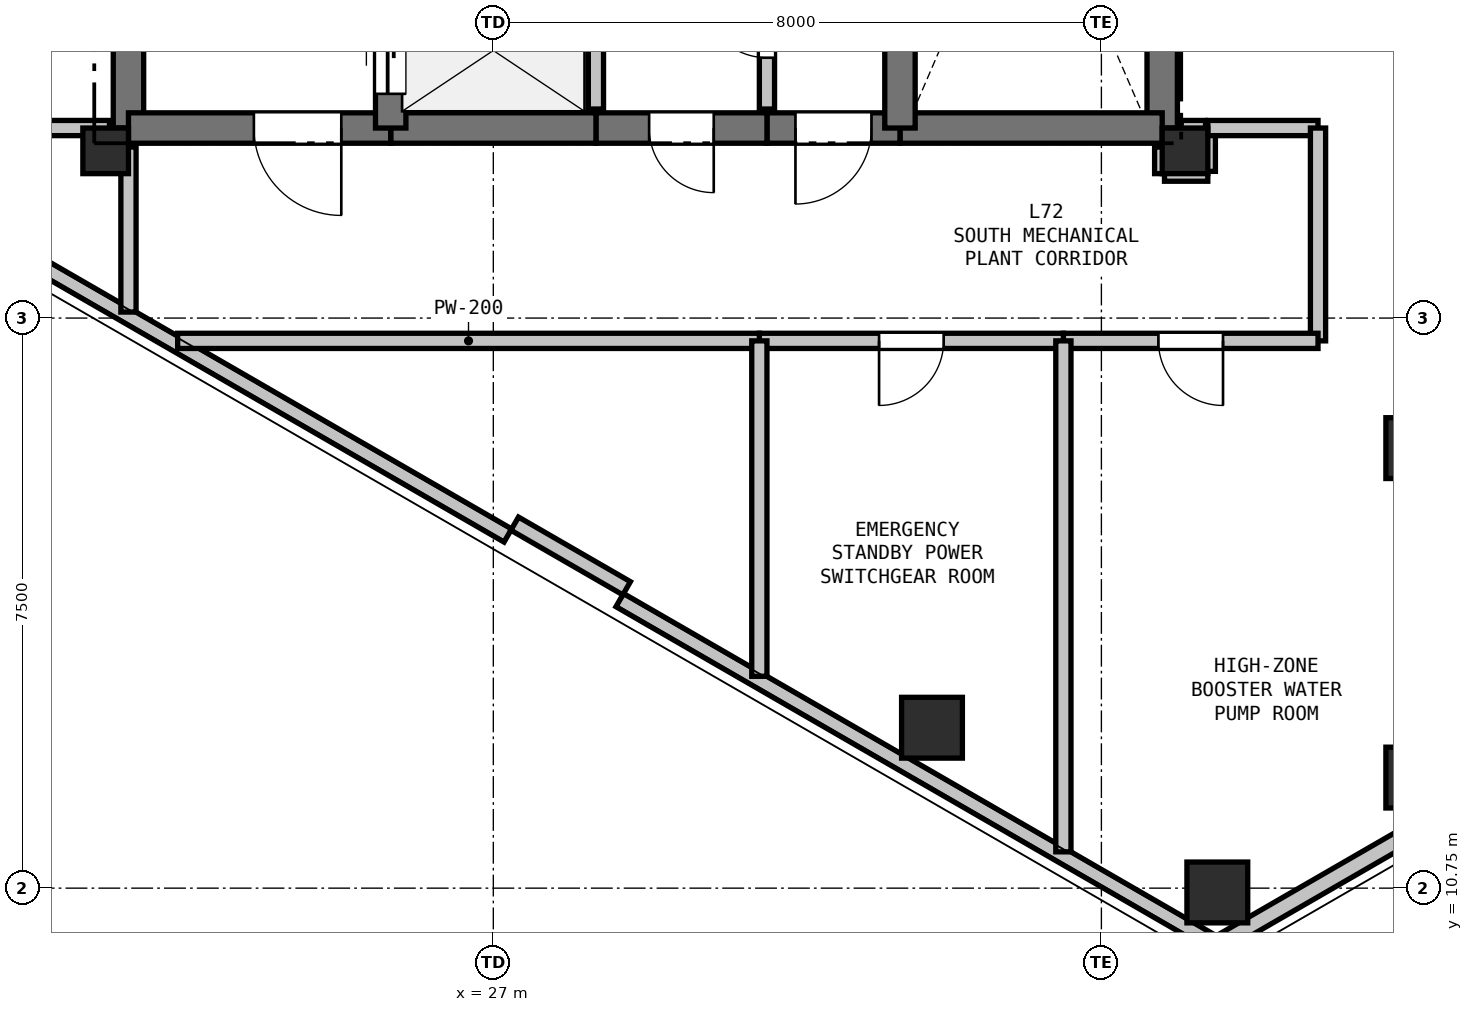
"""IFC4 building model, lengths in metres.
Left out: names, types, materials, properties, quantities, classifications, styles, units other than length and angle.
Written with IfcOpenShell. Run it as: python <this file> out.ifc"""

import sys

from ifc_helpers import new_model, si_unit, direction, frame, frame_2d, origin, origin_2d, place, context, subcontext, project, spatial, rectangle, hollow_rectangle, extrude, element, fill, save


model = new_model("IFC4")
c1 = context("Model", 3, precision=1e-05, world=origin(), true_north=direction((0.0, 1.0)))
c2 = subcontext(c1, "Body", "Model", "MODEL_VIEW")
j1 = project(units=[si_unit("LENGTHUNIT", "METRE"), si_unit("PLANEANGLEUNIT", "RADIAN")], contexts=[c1])
p1 = place(None, origin())
s1 = spatial("IfcSite", under=j1, at=p1, CompositionType="ELEMENT")
p2 = place(p1, origin())
s2 = spatial("IfcBuilding", under=s1, at=p2, CompositionType="ELEMENT")
p3 = place(p2, frame((0.0, 0.0, 258.6)))
s3 = spatial("IfcBuildingStorey", under=s2, at=p3, CompositionType="ELEMENT", Elevation=258.6)
for number, where, z_axis, x_axis in (
    (1, (21.9, 20.45, 0.0), (0.0, 0.0, 1.0), (1.0, 0.0, 0.0)),
    (2, (36.1, 20.45, 0.0), (0.0, 0.0, 1.0), (1.0, 0.0, 0.0)),
):
    element("IfcColumn", number, at=place(p3, frame(where, z_axis=z_axis, x_axis=x_axis)), inside=s3, PredefinedType="COLUMN", context=c2, shape_type="SweptSolid", body=[
        extrude(rectangle(XDim=0.6, YDim=0.6, at=origin_2d()), origin(), (0.0, 0.0, 1.0), 5.4),
    ])
for number, where, z_axis, x_axis in (
    (3, (39.143, 16.539, 0.0), (0.0, 0.0, 1.0), (1.0, 0.0, 0.0)),
    (4, (39.143, 12.205, 0.0), (0.0, 0.0, 1.0), (1.0, 0.0, 0.0)),
    (5, (36.525, 10.693, 0.0), (0.0, 0.0, 1.0), (1.0, 0.0, 0.0)),
    (6, (32.771, 12.861, 0.0), (0.0, 0.0, 1.0), (1.0, 0.0, 0.0)),
):
    element("IfcColumn", number, at=place(p3, frame(where, z_axis=z_axis, x_axis=x_axis)), inside=s3, PredefinedType="COLUMN", context=c2, shape_type="SweptSolid", body=[
        extrude(hollow_rectangle(XDim=0.8, YDim=0.8, WallThickness=0.025, at=origin_2d()), origin(), (0.0, 0.0, 1.0), 5.4),
    ])
p4 = place(p3, frame((39.743, 11.858, 0.0), z_axis=(0.0, 0.0, 1.0), x_axis=(-0.866038962515, -0.499976514854, 0.0)))
e7 = element("IfcWall", 7, at=p4, inside=s3, PredefinedType="SOLIDWALL", context=c2, shape_type="SweptSolid", body=[
    extrude(rectangle(XDim=3.716, YDim=0.225, at=frame_2d((1.858, 0.0))), origin(), (0.0, 0.0, 1.0), 4.7),
])
p5 = place(p3, frame((36.395, 10.076, 0.0), z_axis=(0.0, 0.0, 1.0), x_axis=(-0.866026655105, 0.499997832642, 0.0)))
e8 = element("IfcWall", 8, at=p5, inside=s3, PredefinedType="PARAPET", context=c2, shape_type="SweptSolid", body=[
    extrude(rectangle(XDim=8.928, YDim=0.2, at=frame_2d((4.464, 0.0))), origin(), (0.0, 0.0, 1.0), 0.2),
])
p6 = place(p3, frame((27.191, 15.389, 0.0), z_axis=(0.0, 0.0, 1.0), x_axis=(-0.866019557082, 0.500010126649, 0.0)))
e9 = element("IfcWall", 9, at=p6, inside=s3, PredefinedType="PARAPET", context=c2, shape_type="SweptSolid", body=[
    extrude(rectangle(XDim=8.228, YDim=0.2, at=frame_2d((4.114, 0.0))), origin(), (0.0, 0.0, 1.0), 0.2),
])
p7 = place(p3, frame((28.754, 14.695, 0.0), z_axis=(0.0, 0.0, 1.0), x_axis=(-0.866025371046, 0.500000056704, 0.0)))
e10 = element("IfcWall", 10, at=p7, inside=s3, PredefinedType="PARAPET", context=c2, shape_type="SweptSolid", body=[
    extrude(rectangle(XDim=1.7, YDim=0.2, at=frame_2d((0.85, 0.0))), origin(), (0.0, 0.0, 1.0), 4.7),
])
p8 = place(p3, frame((22.2, 20.75, 0.0), z_axis=(0.0, 0.0, 1.0), x_axis=(0.0, 1.0, 0.0)))
e11 = element("IfcWall", 11, at=p8, inside=s3, PredefinedType="SHEAR", context=c2, shape_type="SweptSolid", body=[
    extrude(rectangle(XDim=4.65, YDim=0.4, at=frame_2d((2.325, 0.0))), origin(), (0.0, 0.0, 1.0), 5.08),
])
p9 = place(p3, frame((35.8, 28.1, 0.0), z_axis=(0.0, 0.0, 1.0), x_axis=(0.0, -1.0, 0.0)))
e12 = element("IfcWall", 12, at=p9, inside=s3, PredefinedType="SHEAR", context=c2, shape_type="SweptSolid", body=[
    extrude(rectangle(XDim=7.35, YDim=0.4, at=frame_2d((3.675, 0.0))), origin(), (0.0, 0.0, 1.0), 5.08),
])
p10 = place(p3, frame((35.8, 20.75, 0.0), z_axis=(0.0, 0.0, 1.0), x_axis=(-1.0, 0.0, 0.0)))
e13 = element("IfcWall", 13, at=p10, inside=s3, PredefinedType="SHEAR", context=c2, shape_type="SweptSolid", body=[
    extrude(rectangle(XDim=3.45, YDim=0.4, at=frame_2d((1.725, 0.0))), origin(), (0.0, 0.0, 1.0), 5.08),
])
p11 = place(p3, frame((32.35, 20.75, 0.0), z_axis=(0.0, 0.0, 1.0), x_axis=(-1.0, 0.0, 0.0)))
e14 = element("IfcWall", 14, at=p11, inside=s3, PredefinedType="SHEAR", context=c2, shape_type="SweptSolid", body=[
    extrude(rectangle(XDim=1.75, YDim=0.4, at=frame_2d((0.875, 0.0))), origin(), (0.0, 0.0, 1.0), 5.08),
])
p12 = place(p11, frame((0.375, 0.0, 0.0)))
e15 = element("IfcOpeningElement", 15, at=p12, cuts=e14, PredefinedType="OPENING", context=c2, shape_type="SweptSolid", body=[
    extrude(rectangle(XDim=1.0, YDim=2.15, at=frame_2d((0.5, 1.075))), frame((0.0, 0.21, 0.0), z_axis=(0.0, -1.0, 0.0), x_axis=(1.0, 0.0, 0.0)), (0.0, 0.0, 1.0), 0.42),
])
p13 = place(p3, frame((30.6, 20.75, 0.0), z_axis=(0.0, 0.0, 1.0), x_axis=(-1.0, 0.0, 0.0)))
e16 = element("IfcWall", 16, at=p13, inside=s3, PredefinedType="SHEAR", context=c2, shape_type="SweptSolid", body=[
    extrude(rectangle(XDim=2.25, YDim=0.4, at=frame_2d((1.125, 0.0))), origin(), (0.0, 0.0, 1.0), 5.08),
])
p14 = place(p13, frame((0.7, 0.0, 0.0)))
e17 = element("IfcOpeningElement", 17, at=p14, cuts=e16, PredefinedType="OPENING", context=c2, shape_type="SweptSolid", body=[
    extrude(rectangle(XDim=0.85, YDim=2.1, at=frame_2d((0.425, 1.05))), frame((0.0, 0.21, 0.0), z_axis=(0.0, -1.0, 0.0), x_axis=(1.0, 0.0, 0.0)), (0.0, 0.0, 1.0), 0.42),
])
p15 = place(p3, frame((28.35, 20.75, 0.0), z_axis=(0.0, 0.0, 1.0), x_axis=(-1.0, 0.0, 0.0)))
e18 = element("IfcWall", 18, at=p15, inside=s3, PredefinedType="SHEAR", context=c2, shape_type="SweptSolid", body=[
    extrude(rectangle(XDim=2.7, YDim=0.4, at=frame_2d((1.35, 0.0))), origin(), (0.0, 0.0, 1.0), 5.08),
])
p16 = place(p3, frame((25.65, 20.75, 0.0), z_axis=(0.0, 0.0, 1.0), x_axis=(-1.0, 0.0, 0.0)))
e19 = element("IfcWall", 19, at=p16, inside=s3, PredefinedType="SHEAR", context=c2, shape_type="SweptSolid", body=[
    extrude(rectangle(XDim=3.45, YDim=0.4, at=frame_2d((1.725, 0.0))), origin(), (0.0, 0.0, 1.0), 5.08),
])
p17 = place(p16, frame((0.65, 0.0, 0.0)))
e20 = element("IfcOpeningElement", 20, at=p17, cuts=e19, PredefinedType="OPENING", context=c2, shape_type="SweptSolid", body=[
    extrude(rectangle(XDim=1.15, YDim=2.15, at=frame_2d((0.575, 1.075))), frame((0.0, 0.21, 0.0), z_axis=(0.0, -1.0, 0.0), x_axis=(1.0, 0.0, 0.0)), (0.0, 0.0, 1.0), 0.42),
])
p18 = place(p3, frame((25.65, 20.75, 0.0), z_axis=(0.0, 0.0, 1.0), x_axis=(0.0, 1.0, 0.0)))
e21 = element("IfcWall", 21, at=p18, inside=s3, PredefinedType="SHEAR", context=c2, shape_type="SweptSolid", body=[
    extrude(rectangle(XDim=2.0, YDim=0.4, at=frame_2d((1.0, 0.0))), origin(), (0.0, 0.0, 1.0), 5.08),
])
p19 = place(p18, frame((0.45, 0.0, 0.0)))
e22 = element("IfcOpeningElement", 22, at=p19, cuts=e21, PredefinedType="OPENING", context=c2, shape_type="SweptSolid", body=[
    extrude(rectangle(XDim=1.1, YDim=2.15, at=frame_2d((0.55, 1.075))), frame((0.0, 0.21, 0.0), z_axis=(0.0, -1.0, 0.0), x_axis=(1.0, 0.0, 0.0)), (0.0, 0.0, 1.0), 0.42),
])
p20 = place(p3, frame((32.35, 20.75, 0.0), z_axis=(0.0, 0.0, 1.0), x_axis=(0.0, 1.0, 0.0)))
e23 = element("IfcWall", 23, at=p20, inside=s3, PredefinedType="SHEAR", context=c2, shape_type="SweptSolid", body=[
    extrude(rectangle(XDim=4.8, YDim=0.4, at=frame_2d((2.4, 0.0))), origin(), (0.0, 0.0, 1.0), 5.08),
])
p21 = place(p3, frame((28.35, 23.2, 0.0), z_axis=(0.0, 0.0, 1.0), x_axis=(0.0, -1.0, 0.0)))
e24 = element("IfcWall", 24, at=p21, inside=s3, PredefinedType="PARTITIONING", context=c2, shape_type="SweptSolid", body=[
    extrude(rectangle(XDim=2.2, YDim=0.2, at=frame_2d((1.1, 0.0))), origin(), (0.0, 0.0, 1.0), 5.08),
])
p22 = place(p3, frame((30.6, 21.0, 0.0), z_axis=(0.0, 0.0, 1.0), x_axis=(0.0, 1.0, 0.0)))
e25 = element("IfcWall", 25, at=p22, inside=s3, PredefinedType="PARTITIONING", context=c2, shape_type="SweptSolid", body=[
    extrude(rectangle(XDim=2.2, YDim=0.2, at=frame_2d((1.1, 0.0))), origin(), (0.0, 0.0, 1.0), 5.08),
])
p23 = place(p22, frame((0.675, 0.0, 0.0)))
e26 = element("IfcOpeningElement", 26, at=p23, cuts=e25, PredefinedType="OPENING", context=c2, shape_type="SweptSolid", body=[
    extrude(rectangle(XDim=0.85, YDim=2.1, at=frame_2d((0.425, 1.05))), frame((0.0, 0.11, 0.0), z_axis=(0.0, -1.0, 0.0), x_axis=(1.0, 0.0, 0.0)), (0.0, 0.0, 1.0), 0.22),
])
p24 = place(p3, frame((35.8, 20.5, 0.0), z_axis=(0.0, 0.0, 1.0), x_axis=(0.0, -1.0, 0.0)))
e27 = element("IfcWall", 27, at=p24, inside=s3, PredefinedType="PARTITIONING", context=c2, shape_type="SweptSolid", body=[
    extrude(rectangle(XDim=0.35, YDim=0.2, at=frame_2d((0.175, 0.0))), origin(), (0.0, 0.0, 1.0), 4.605),
])
p25 = place(p3, frame((35.83, 20.15, 0.0), z_axis=(0.0, 0.0, 1.0), x_axis=(1.0, 0.0, 0.0)))
e28 = element("IfcWall", 28, at=p25, inside=s3, PredefinedType="PARTITIONING", context=c2, shape_type="SweptSolid", body=[
    extrude(rectangle(XDim=0.57, YDim=0.2, at=frame_2d((0.285, 0.0))), origin(), (0.0, 0.0, 1.0), 4.528),
])
p26 = place(p3, frame((36.4, 20.18, 0.0), z_axis=(0.0, 0.0, 1.0), x_axis=(0.0, 1.0, 0.0)))
e29 = element("IfcWall", 29, at=p26, inside=s3, PredefinedType="PARTITIONING", context=c2, shape_type="SweptSolid", body=[
    extrude(rectangle(XDim=0.57, YDim=0.2, at=frame_2d((0.285, 0.0))), origin(), (0.0, 0.0, 1.0), 5.08),
])
p27 = place(p3, frame((36.4, 20.75, 0.0), z_axis=(0.0, 0.0, 1.0), x_axis=(1.0, 0.0, 0.0)))
e30 = element("IfcWall", 30, at=p27, inside=s3, PredefinedType="PARTITIONING", context=c2, shape_type="SweptSolid", body=[
    extrude(rectangle(XDim=1.45, YDim=0.2, at=frame_2d((0.725, 0.0))), origin(), (0.0, 0.0, 1.0), 5.08),
])
p28 = place(p3, frame((37.85, 20.75, 0.0), z_axis=(0.0, 0.0, 1.0), x_axis=(0.0, -1.0, 0.0)))
e31 = element("IfcWall", 31, at=p28, inside=s3, PredefinedType="PARTITIONING", context=c2, shape_type="SweptSolid", body=[
    extrude(rectangle(XDim=2.8, YDim=0.2, at=frame_2d((1.4, 0.0))), origin(), (0.0, 0.0, 1.0), 5.08),
])
p29 = place(p3, frame((37.85, 17.95, 0.0), z_axis=(0.0, 0.0, 1.0), x_axis=(-1.0, 0.0, 0.0)))
e32 = element("IfcWall", 32, at=p29, inside=s3, PredefinedType="PARTITIONING", context=c2, shape_type="SweptSolid", body=[
    extrude(rectangle(XDim=3.35, YDim=0.2, at=frame_2d((1.675, 0.0))), origin(), (0.0, 0.0, 1.0), 4.528),
])
p30 = place(p29, frame((1.25, 0.0, 0.0)))
e33 = element("IfcOpeningElement", 33, at=p30, cuts=e32, PredefinedType="OPENING", context=c2, shape_type="SweptSolid", body=[
    extrude(rectangle(XDim=0.85, YDim=2.1, at=frame_2d((0.425, 1.05))), frame((0.0, 0.11, 0.0), z_axis=(0.0, -1.0, 0.0), x_axis=(1.0, 0.0, 0.0)), (0.0, 0.0, 1.0), 0.22),
])
p31 = place(p3, frame((34.5, 17.95, 0.0), z_axis=(0.0, 0.0, 1.0), x_axis=(-1.0, 0.0, 0.0)))
e34 = element("IfcWall", 34, at=p31, inside=s3, PredefinedType="PARTITIONING", context=c2, shape_type="SweptSolid", body=[
    extrude(rectangle(XDim=4.0, YDim=0.2, at=frame_2d((2.0, 0.0))), origin(), (0.0, 0.0, 1.0), 5.08),
])
p32 = place(p31, frame((1.575, 0.0, 0.0)))
e35 = element("IfcOpeningElement", 35, at=p32, cuts=e34, PredefinedType="OPENING", context=c2, shape_type="SweptSolid", body=[
    extrude(rectangle(XDim=0.85, YDim=2.1, at=frame_2d((0.425, 1.05))), frame((0.0, 0.11, 0.0), z_axis=(0.0, -1.0, 0.0), x_axis=(1.0, 0.0, 0.0)), (0.0, 0.0, 1.0), 0.22),
])
p33 = place(p3, frame((30.5, 17.95, 0.0), z_axis=(0.0, 0.0, 1.0), x_axis=(-1.0, 0.0, 0.0)))
e36 = element("IfcWall", 36, at=p33, inside=s3, PredefinedType="PARTITIONING", context=c2, shape_type="SweptSolid", body=[
    extrude(rectangle(XDim=7.653, YDim=0.2, at=frame_2d((3.826, 0.0))), origin(), (0.0, 0.0, 1.0), 4.528),
])
p34 = place(p3, frame((22.2, 18.329, 0.0), z_axis=(0.0, 0.0, 1.0), x_axis=(0.0, 1.0, 0.0)))
e37 = element("IfcWall", 37, at=p34, inside=s3, PredefinedType="PARTITIONING", context=c2, shape_type="SweptSolid", body=[
    extrude(rectangle(XDim=2.171, YDim=0.2, at=frame_2d((1.085, 0.0))), origin(), (0.0, 0.0, 1.0), 4.528),
])
p35 = place(p3, frame((21.95, 20.75, 0.0), z_axis=(0.0, 0.0, 1.0), x_axis=(-1.0, 0.0, 0.0)))
e38 = element("IfcWall", 38, at=p35, inside=s3, PredefinedType="PARTITIONING", context=c2, shape_type="SweptSolid", body=[
    extrude(rectangle(XDim=1.45, YDim=0.2, at=frame_2d((0.725, 0.0))), origin(), (0.0, 0.0, 1.0), 4.528),
])
p36 = place(p3, frame((34.5, 17.95, 0.0), z_axis=(0.0, 0.0, 1.0), x_axis=(0.0, -1.0, 0.0)))
e39 = element("IfcWall", 39, at=p36, inside=s3, PredefinedType="PARTITIONING", context=c2, shape_type="SweptSolid", body=[
    extrude(rectangle(XDim=6.722, YDim=0.2, at=frame_2d((3.361, 0.0))), origin(), (0.0, 0.0, 1.0), 4.805),
])
p37 = place(p3, frame((30.5, 13.537, 0.0), z_axis=(0.0, 0.0, 1.0), x_axis=(0.0, 1.0, 0.0)))
e40 = element("IfcWall", 40, at=p37, inside=s3, PredefinedType="PARTITIONING", context=c2, shape_type="SweptSolid", body=[
    extrude(rectangle(XDim=4.413, YDim=0.2, at=frame_2d((2.207, 0.0))), origin(), (0.0, 0.0, 1.0), 4.528),
])
p38 = place(p3, frame((36.37, 20.75, 0.0), z_axis=(0.0, 0.0, 1.0), x_axis=(-1.0, 0.0, 0.0)))
e41 = element("IfcWall", 41, at=p38, inside=s3, PredefinedType="PARTITIONING", context=c2, shape_type="SweptSolid", body=[
    extrude(rectangle(XDim=0.32, YDim=0.2, at=frame_2d((0.16, 0.0))), origin(), (0.0, 0.0, 1.0), 4.605),
])
p39 = place(p12, origin())
e42 = element("IfcDoor", 42, at=p39, inside=s3, OperationType="SINGLE_SWING_RIGHT", PredefinedType="DOOR", context=c2, shape_type="SweptSolid", body=[
    extrude(rectangle(XDim=1.0, YDim=2.15, at=frame_2d((0.5, 1.075))), frame((0.0, 0.025, 0.0), z_axis=(0.0, -1.0, 0.0), x_axis=(1.0, 0.0, 0.0)), (0.0, 0.0, 1.0), 0.05),
])
fill(e15, e42)
p40 = place(p19, origin())
e43 = element("IfcDoor", 43, at=p40, inside=s3, OperationType="SLIDING_TO_LEFT", PredefinedType="DOOR", context=c2, shape_type="SweptSolid", body=[
    extrude(rectangle(XDim=1.1, YDim=2.15, at=frame_2d((0.55, 1.075))), frame((0.0, 0.025, 0.0), z_axis=(0.0, -1.0, 0.0), x_axis=(1.0, 0.0, 0.0)), (0.0, 0.0, 1.0), 0.05),
])
fill(e22, e43)
p41 = place(p17, origin())
e44 = element("IfcDoor", 44, at=p41, inside=s3, OperationType="SINGLE_SWING_LEFT", PredefinedType="DOOR", context=c2, shape_type="SweptSolid", body=[
    extrude(rectangle(XDim=1.15, YDim=2.15, at=frame_2d((0.575, 1.075))), frame((0.0, 0.025, 0.0), z_axis=(0.0, -1.0, 0.0), x_axis=(1.0, 0.0, 0.0)), (0.0, 0.0, 1.0), 0.05),
])
fill(e20, e44)
p42 = place(p23, origin())
e45 = element("IfcDoor", 45, at=p42, inside=s3, OperationType="SINGLE_SWING_RIGHT", PredefinedType="DOOR", context=c2, shape_type="SweptSolid", body=[
    extrude(rectangle(XDim=0.85, YDim=2.1, at=frame_2d((0.425, 1.05))), frame((0.0, 0.025, 0.0), z_axis=(0.0, -1.0, 0.0), x_axis=(1.0, 0.0, 0.0)), (0.0, 0.0, 1.0), 0.05),
])
fill(e26, e45)
p43 = place(p14, origin())
e46 = element("IfcDoor", 46, at=p43, inside=s3, OperationType="SINGLE_SWING_LEFT", PredefinedType="DOOR", context=c2, shape_type="SweptSolid", body=[
    extrude(rectangle(XDim=0.85, YDim=2.1, at=frame_2d((0.425, 1.05))), frame((0.0, 0.025, 0.0), z_axis=(0.0, -1.0, 0.0), x_axis=(1.0, 0.0, 0.0)), (0.0, 0.0, 1.0), 0.05),
])
fill(e17, e46)
p44 = place(p32, origin())
e47 = element("IfcDoor", 47, at=p44, inside=s3, OperationType="SINGLE_SWING_RIGHT", PredefinedType="DOOR", context=c2, shape_type="SweptSolid", body=[
    extrude(rectangle(XDim=0.85, YDim=2.1, at=frame_2d((0.425, 1.05))), frame((0.0, 0.025, 0.0), z_axis=(0.0, -1.0, 0.0), x_axis=(1.0, 0.0, 0.0)), (0.0, 0.0, 1.0), 0.05),
])
fill(e35, e47)
p45 = place(p30, origin())
e48 = element("IfcDoor", 48, at=p45, inside=s3, OperationType="SINGLE_SWING_LEFT", PredefinedType="DOOR", context=c2, shape_type="SweptSolid", body=[
    extrude(rectangle(XDim=0.85, YDim=2.1, at=frame_2d((0.425, 1.05))), frame((0.0, 0.025, 0.0), z_axis=(0.0, -1.0, 0.0), x_axis=(1.0, 0.0, 0.0)), (0.0, 0.0, 1.0), 0.05),
])
fill(e33, e48)
save(model, sys.argv[1])
